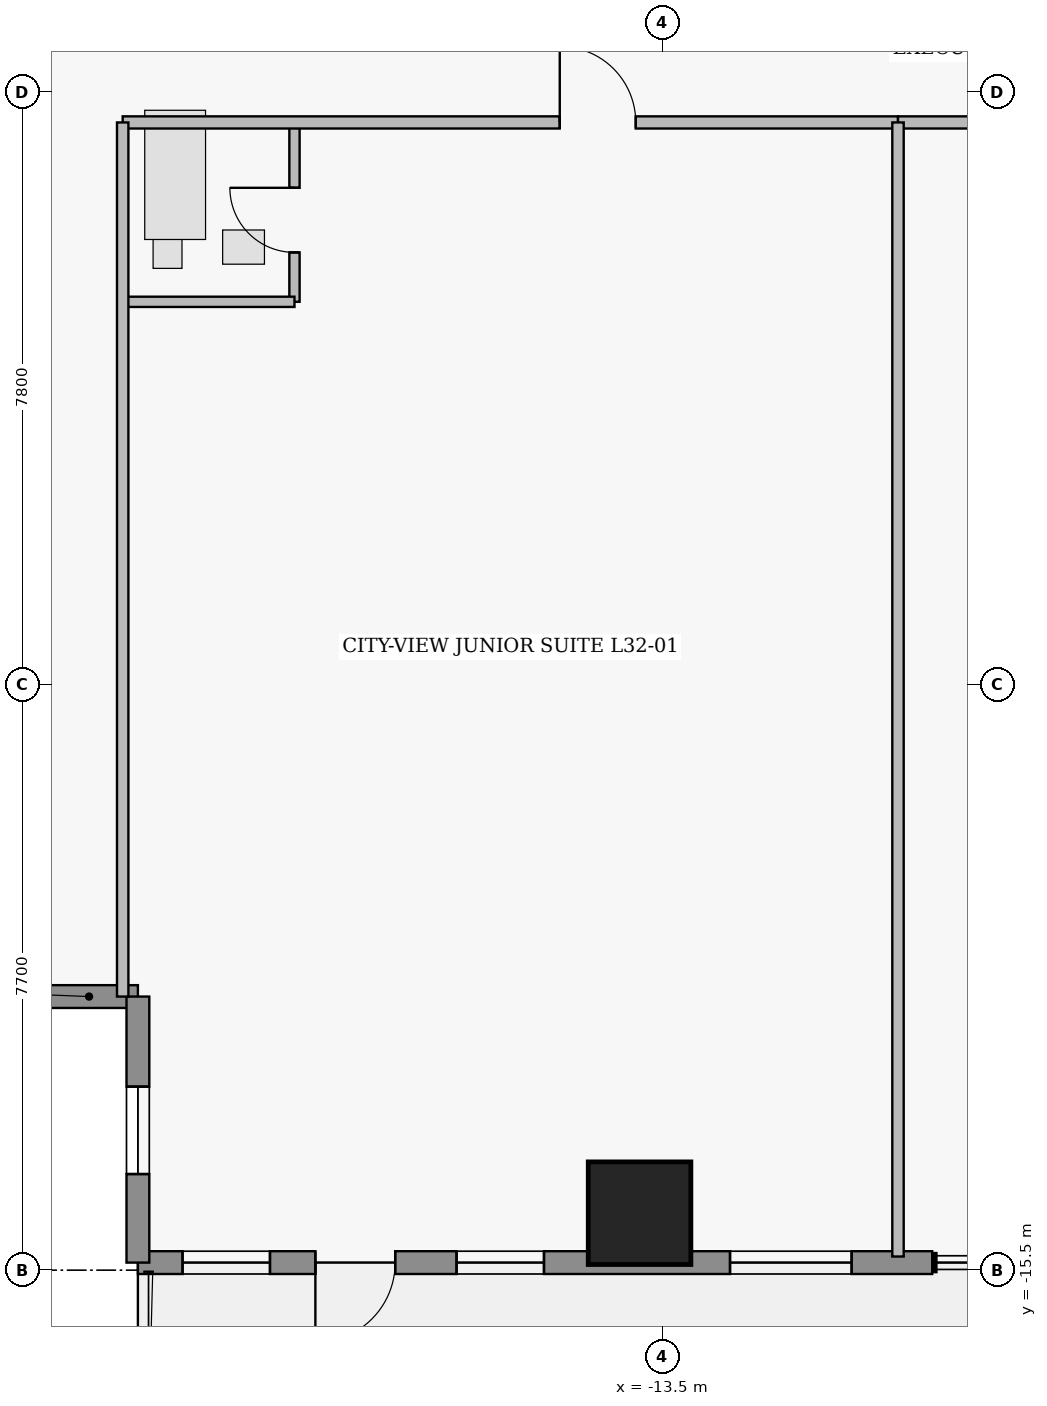
"""IFC4 building model, lengths in metres.
Left out: names, types, materials, properties, quantities, classifications, styles, units other than length and angle.
Written with IfcOpenShell. Run it as: python <this file> out.ifc"""

import sys

from ifc_helpers import new_model, si_unit, direction, frame, frame_2d, origin, origin_2d, place, context, subcontext, project, spatial, rectangle, extrude, element, fill, save


model = new_model("IFC4")
c1 = context("Model", 3, precision=1e-05, world=origin(), true_north=direction((0.0, 1.0)))
c2 = subcontext(c1, "Body", "Model", "MODEL_VIEW")
j1 = project(units=[si_unit("LENGTHUNIT", "METRE"), si_unit("PLANEANGLEUNIT", "RADIAN")], contexts=[c1])
p1 = place(None, origin())
s1 = spatial("IfcSite", under=j1, at=p1, CompositionType="ELEMENT")
p2 = place(p1, origin())
s2 = spatial("IfcBuilding", under=s1, at=p2, CompositionType="ELEMENT")
p3 = place(p2, frame((0.0, 0.0, 128.5)))
s3 = spatial("IfcBuildingStorey", under=s2, at=p3, CompositionType="ELEMENT", Elevation=128.5)
p4 = place(p3, frame((-13.8, -14.75, 0.0), z_axis=(0.0, 0.0, 1.0), x_axis=(1.0, 0.0, 0.0)))
e1 = element("IfcColumn", 1, at=p4, inside=s3, PredefinedType="COLUMN", context=c2, shape_type="SweptSolid", body=[
    extrude(rectangle(XDim=1.35, YDim=1.35, at=origin_2d()), origin(), (0.0, 0.0, 1.0), 3.65),
])
p5 = place(p3, frame((-20.4, -11.9, 0.0), z_axis=(0.0, 0.0, 1.0), x_axis=(-1.0, 0.0, 0.0)))
e2 = element("IfcWall", 2, at=p5, inside=s3, PredefinedType="STANDARD", context=c2, shape_type="SweptSolid", body=[
    extrude(rectangle(XDim=3.5, YDim=0.3, at=frame_2d((1.75, 0.0))), origin(), (0.0, 0.0, 1.0), 3.43),
])
p6 = place(p5, frame((1.285, 0.0, 1.25)))
e3 = element("IfcOpeningElement", 3, at=p6, cuts=e2, PredefinedType="OPENING", context=c2, shape_type="SweptSolid", body=[
    extrude(rectangle(XDim=1.15, YDim=1.55, at=frame_2d((0.575, 0.775))), frame((0.0, 0.16, 0.0), z_axis=(0.0, -1.0, 0.0), x_axis=(1.0, 0.0, 0.0)), (0.0, 0.0, 1.0), 0.32),
])
p7 = place(p3, frame((-9.95, -15.4, 0.0), z_axis=(0.0, 0.0, 1.0), x_axis=(-1.0, 0.0, 0.0)))
e4 = element("IfcWall", 4, at=p7, inside=s3, PredefinedType="STANDARD", context=c2, shape_type="SweptSolid", body=[
    extrude(rectangle(XDim=10.45, YDim=0.3, at=frame_2d((5.225, 0.0))), origin(), (0.0, 0.0, 1.0), 3.43),
])
p8 = place(p7, frame((7.065, 0.0, 0.0)))
e5 = element("IfcOpeningElement", 5, at=p8, cuts=e4, PredefinedType="OPENING", context=c2, shape_type="SweptSolid", body=[
    extrude(rectangle(XDim=1.05, YDim=2.2, at=frame_2d((0.525, 1.1))), frame((0.0, 0.16, 0.0), z_axis=(0.0, -1.0, 0.0), x_axis=(1.0, 0.0, 0.0)), (0.0, 0.0, 1.0), 0.32),
])
p9 = place(p7, frame((1.06, 0.0, 0.85)))
e6 = element("IfcOpeningElement", 6, at=p9, cuts=e4, PredefinedType="OPENING", context=c2, shape_type="SweptSolid", body=[
    extrude(rectangle(XDim=1.6, YDim=1.8, at=frame_2d((0.8, 0.9))), frame((0.0, 0.16, 0.0), z_axis=(0.0, -1.0, 0.0), x_axis=(1.0, 0.0, 0.0)), (0.0, 0.0, 1.0), 0.32),
])
p10 = place(p7, frame((5.107, 0.0, 0.95)))
e7 = element("IfcOpeningElement", 7, at=p10, cuts=e4, PredefinedType="OPENING", context=c2, shape_type="SweptSolid", body=[
    extrude(rectangle(XDim=1.15, YDim=1.55, at=frame_2d((0.575, 0.775))), frame((0.0, 0.16, 0.0), z_axis=(0.0, -1.0, 0.0), x_axis=(1.0, 0.0, 0.0)), (0.0, 0.0, 1.0), 0.32),
])
p11 = place(p7, frame((8.712, 0.0, 0.95)))
e8 = element("IfcOpeningElement", 8, at=p11, cuts=e4, PredefinedType="OPENING", context=c2, shape_type="SweptSolid", body=[
    extrude(rectangle(XDim=1.15, YDim=1.55, at=frame_2d((0.575, 0.775))), frame((0.0, 0.16, 0.0), z_axis=(0.0, -1.0, 0.0), x_axis=(1.0, 0.0, 0.0)), (0.0, 0.0, 1.0), 0.32),
])
p12 = place(p3, frame((-20.4, -15.4, 0.0), z_axis=(0.0, 0.0, 1.0), x_axis=(0.0, 1.0, 0.0)))
e9 = element("IfcWall", 9, at=p12, inside=s3, PredefinedType="STANDARD", context=c2, shape_type="SweptSolid", body=[
    extrude(rectangle(XDim=3.5, YDim=0.3, at=frame_2d((1.75, 0.0))), origin(), (0.0, 0.0, 1.0), 3.43),
])
p13 = place(p12, frame((1.165, 0.0, 1.25)))
e10 = element("IfcOpeningElement", 10, at=p13, cuts=e9, PredefinedType="OPENING", context=c2, shape_type="SweptSolid", body=[
    extrude(rectangle(XDim=1.15, YDim=1.55, at=frame_2d((0.575, 0.775))), frame((0.0, 0.16, 0.0), z_axis=(0.0, -1.0, 0.0), x_axis=(1.0, 0.0, 0.0)), (0.0, 0.0, 1.0), 0.32),
])
p14 = place(p3, frame((-18.34, -2.76, 0.0), z_axis=(0.0, 0.0, 1.0), x_axis=(0.0, 1.0, 0.0)))
e11 = element("IfcWall", 11, at=p14, inside=s3, PredefinedType="PLUMBINGWALL", context=c2, shape_type="SweptSolid", body=[
    extrude(rectangle(XDim=2.36, YDim=0.135, at=frame_2d((1.18, 0.0))), origin(), (0.0, 0.0, 1.0), 3.43),
])
p15 = place(p14, frame((0.65, 0.0, 0.0)))
e12 = element("IfcOpeningElement", 12, at=p15, cuts=e11, PredefinedType="OPENING", context=c2, shape_type="SweptSolid", body=[
    extrude(rectangle(XDim=0.85, YDim=2.1, at=frame_2d((0.425, 1.05))), frame((0.0, 0.077, 0.0), z_axis=(0.0, -1.0, 0.0), x_axis=(1.0, 0.0, 0.0)), (0.0, 0.0, 1.0), 0.155),
])
p16 = place(p3, frame((-20.6, -0.4, 0.0), z_axis=(0.0, 0.0, 1.0), x_axis=(1.0, 0.0, 0.0)))
e13 = element("IfcWall", 13, at=p16, inside=s3, PredefinedType="PARTITIONING", context=c2, shape_type="SweptSolid", body=[
    extrude(rectangle(XDim=10.2, YDim=0.16, at=frame_2d((5.1, 0.0))), origin(), (0.0, 0.0, 1.0), 3.43),
])
p17 = place(p16, frame((5.75, 0.0, 0.0)))
e14 = element("IfcOpeningElement", 14, at=p17, cuts=e13, PredefinedType="OPENING", context=c2, shape_type="SweptSolid", body=[
    extrude(rectangle(XDim=1.0, YDim=2.15, at=frame_2d((0.5, 1.075))), frame((0.0, 0.09, 0.0), z_axis=(0.0, -1.0, 0.0), x_axis=(1.0, 0.0, 0.0)), (0.0, 0.0, 1.0), 0.18),
])
p18 = place(p3, frame((-10.4, -0.4, 0.0), z_axis=(0.0, 0.0, 1.0), x_axis=(1.0, 0.0, 0.0)))
e15 = element("IfcWall", 15, at=p18, inside=s3, PredefinedType="PARTITIONING", context=c2, shape_type="SweptSolid", body=[
    extrude(rectangle(XDim=10.4, YDim=0.16, at=frame_2d((5.2, 0.0))), origin(), (0.0, 0.0, 1.0), 3.43),
])
p19 = place(p18, frame((7.61, 0.0, 0.0)))
e16 = element("IfcOpeningElement", 16, at=p19, cuts=e15, PredefinedType="OPENING", context=c2, shape_type="SweptSolid", body=[
    extrude(rectangle(XDim=1.08, YDim=2.18, at=frame_2d((0.54, 1.09))), frame((0.0, 0.09, 0.0), z_axis=(0.0, -1.0, 0.0), x_axis=(1.0, 0.0, 0.0)), (0.0, 0.0, 1.0), 0.18),
])
p20 = place(p3, frame((-20.6, -2.76, 0.0), z_axis=(0.0, 0.0, 1.0), x_axis=(1.0, 0.0, 0.0)))
e17 = element("IfcWall", 17, at=p20, inside=s3, PredefinedType="PLUMBINGWALL", context=c2, shape_type="SweptSolid", body=[
    extrude(rectangle(XDim=2.26, YDim=0.135, at=frame_2d((1.13, 0.0))), origin(), (0.0, 0.0, 1.0), 3.43),
])
p21 = place(p3, frame((-20.6, -11.9, 0.0), z_axis=(0.0, 0.0, 1.0), x_axis=(0.0, 1.0, 0.0)))
e18 = element("IfcWall", 18, at=p21, inside=s3, PredefinedType="PARTITIONING", context=c2, shape_type="SweptSolid", body=[
    extrude(rectangle(XDim=11.5, YDim=0.15, at=frame_2d((5.75, 0.0))), origin(), (0.0, 0.0, 1.0), 3.43),
])
p22 = place(p3, frame((-10.4, -15.32, 0.0), z_axis=(0.0, 0.0, 1.0), x_axis=(0.0, 1.0, 0.0)))
e19 = element("IfcWall", 19, at=p22, inside=s3, PredefinedType="PARTITIONING", context=c2, shape_type="SweptSolid", body=[
    extrude(rectangle(XDim=14.92, YDim=0.15, at=frame_2d((7.46, 0.0))), origin(), (0.0, 0.0, 1.0), 3.43),
])
p23 = place(p8, origin())
e20 = element("IfcDoor", 20, at=p23, inside=s3, OperationType="SINGLE_SWING_RIGHT", PredefinedType="DOOR", context=c2, shape_type="SweptSolid", body=[
    extrude(rectangle(XDim=1.05, YDim=2.2, at=frame_2d((0.525, 1.1))), frame((0.0, 0.025, 0.0), z_axis=(0.0, -1.0, 0.0), x_axis=(1.0, 0.0, 0.0)), (0.0, 0.0, 1.0), 0.05),
])
fill(e5, e20)
p24 = place(p9, origin())
e21 = element("IfcWindow", 21, at=p24, inside=s3, PartitioningType="SINGLE_PANEL", PredefinedType="WINDOW", context=c2, shape_type="SweptSolid", body=[
    extrude(rectangle(XDim=1.6, YDim=1.8, at=frame_2d((0.8, 0.9))), frame((0.0, 0.03, 0.0), z_axis=(0.0, -1.0, 0.0), x_axis=(1.0, 0.0, 0.0)), (0.0, 0.0, 1.0), 0.06),
])
fill(e6, e21)
p25 = place(p10, origin())
e22 = element("IfcWindow", 22, at=p25, inside=s3, PartitioningType="SINGLE_PANEL", PredefinedType="WINDOW", context=c2, shape_type="SweptSolid", body=[
    extrude(rectangle(XDim=1.15, YDim=1.55, at=frame_2d((0.575, 0.775))), frame((0.0, 0.03, 0.0), z_axis=(0.0, -1.0, 0.0), x_axis=(1.0, 0.0, 0.0)), (0.0, 0.0, 1.0), 0.06),
])
fill(e7, e22)
p26 = place(p11, origin())
e23 = element("IfcWindow", 23, at=p26, inside=s3, PartitioningType="SINGLE_PANEL", PredefinedType="WINDOW", context=c2, shape_type="SweptSolid", body=[
    extrude(rectangle(XDim=1.15, YDim=1.55, at=frame_2d((0.575, 0.775))), frame((0.0, 0.03, 0.0), z_axis=(0.0, -1.0, 0.0), x_axis=(1.0, 0.0, 0.0)), (0.0, 0.0, 1.0), 0.06),
])
fill(e8, e23)
p27 = place(p13, origin())
e24 = element("IfcWindow", 24, at=p27, inside=s3, PartitioningType="SINGLE_PANEL", PredefinedType="WINDOW", context=c2, shape_type="SweptSolid", body=[
    extrude(rectangle(XDim=1.15, YDim=1.55, at=frame_2d((0.575, 0.775))), frame((0.0, 0.03, 0.0), z_axis=(0.0, -1.0, 0.0), x_axis=(1.0, 0.0, 0.0)), (0.0, 0.0, 1.0), 0.06),
])
fill(e10, e24)
p28 = place(p15, origin())
e25 = element("IfcDoor", 25, at=p28, inside=s3, OperationType="SINGLE_SWING_RIGHT", PredefinedType="DOOR", context=c2, shape_type="SweptSolid", body=[
    extrude(rectangle(XDim=0.85, YDim=2.1, at=frame_2d((0.425, 1.05))), frame((0.0, 0.025, 0.0), z_axis=(0.0, -1.0, 0.0), x_axis=(1.0, 0.0, 0.0)), (0.0, 0.0, 1.0), 0.05),
])
fill(e12, e25)
p29 = place(p17, origin())
e26 = element("IfcDoor", 26, at=p29, inside=s3, OperationType="SINGLE_SWING_LEFT", PredefinedType="DOOR", context=c2, shape_type="SweptSolid", body=[
    extrude(rectangle(XDim=1.0, YDim=2.15, at=frame_2d((0.5, 1.075))), frame((0.0, 0.025, 0.0), z_axis=(0.0, -1.0, 0.0), x_axis=(1.0, 0.0, 0.0)), (0.0, 0.0, 1.0), 0.05),
])
fill(e14, e26)
save(model, sys.argv[1])
